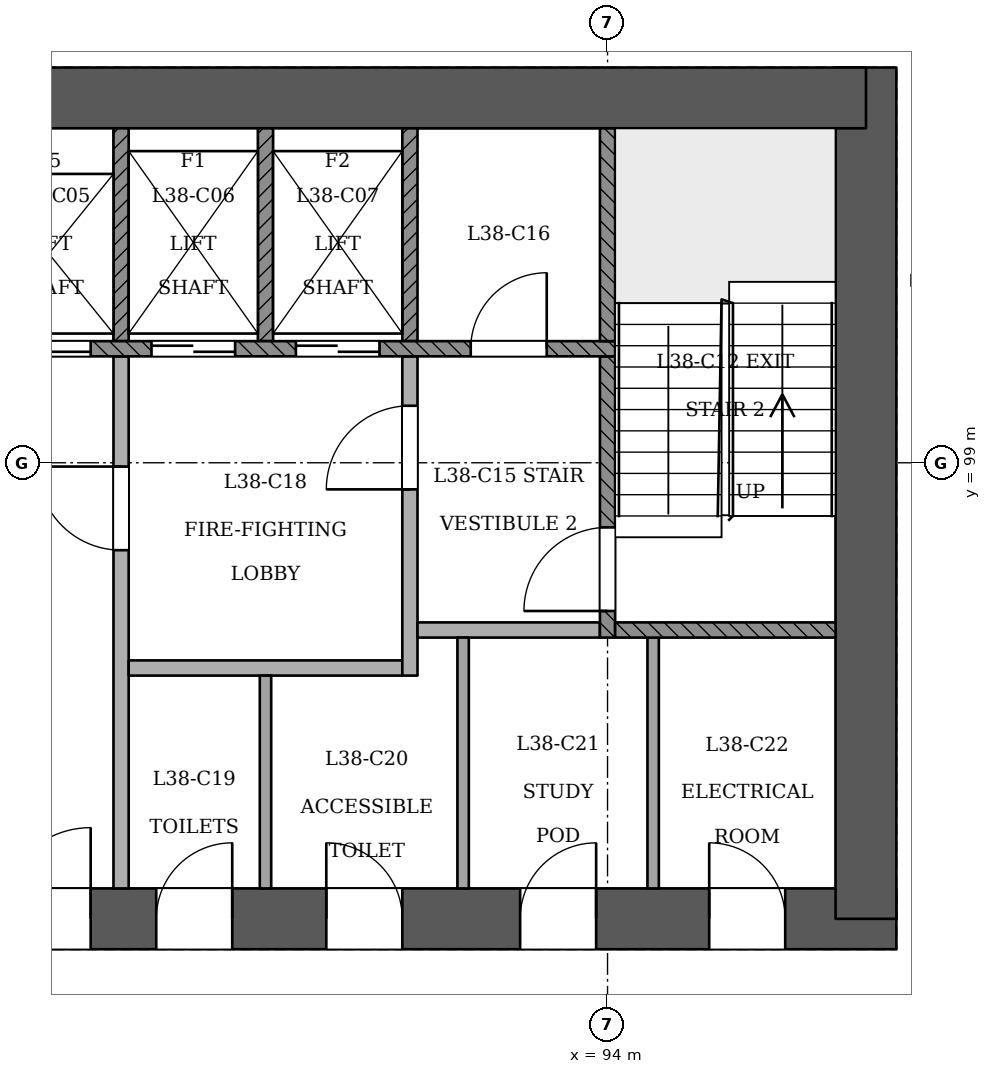
"""IFC4 building model, lengths in metres.
Left out: names, types, materials, properties, quantities, classifications, styles, units other than length and angle.
Written with IfcOpenShell. Run it as: python <this file> out.ifc"""

import sys

from ifc_helpers import new_model, si_unit, direction, frame, frame_2d, origin, place, context, subcontext, project, spatial, rectangle, extrude, element, fill, save


model = new_model("IFC4")
c1 = context("Model", 3, precision=1e-05, world=origin(), true_north=direction((0.0, 1.0)))
c2 = subcontext(c1, "Body", "Model", "MODEL_VIEW")
j1 = project(units=[si_unit("LENGTHUNIT", "METRE"), si_unit("PLANEANGLEUNIT", "RADIAN")], contexts=[c1])
p1 = place(None, origin())
s1 = spatial("IfcSite", under=j1, at=p1, CompositionType="ELEMENT")
p2 = place(p1, origin())
s2 = spatial("IfcBuilding", under=s1, at=p2, CompositionType="ELEMENT")
p3 = place(p2, frame((0.0, 0.0, 149.4)))
s3 = spatial("IfcBuildingStorey", under=s2, at=p3, CompositionType="ELEMENT", Elevation=149.4)
p4 = place(p3, frame((72.6, 93.0, 0.0), z_axis=(0.0, 0.0, 1.0), x_axis=(1.0, 0.0, 0.0)))
e1 = element("IfcWall", 1, at=p4, inside=s3, PredefinedType="SHEAR", context=c2, shape_type="SweptSolid", body=[
    extrude(rectangle(XDim=25.2, YDim=0.8, at=frame_2d((12.6, 0.0))), origin(), (0.0, 0.0, 1.0), 3.6),
])
p5 = place(p4, frame((1.2, 0.0, 0.0)))
e2 = element("IfcOpeningElement", 2, at=p5, cuts=e1, PredefinedType="OPENING", context=c2, shape_type="SweptSolid", body=[
    extrude(rectangle(XDim=1.2, YDim=2.1, at=frame_2d((0.6, 1.05))), frame((0.0, 0.411, 0.0), z_axis=(0.0, -1.0, 0.0), x_axis=(1.0, 0.0, 0.0)), (0.0, 0.0, 1.0), 0.821),
])
p6 = place(p4, frame((3.4, 0.0, 0.0)))
e3 = element("IfcOpeningElement", 3, at=p6, cuts=e1, PredefinedType="OPENING", context=c2, shape_type="SweptSolid", body=[
    extrude(rectangle(XDim=1.2, YDim=2.1, at=frame_2d((0.6, 1.05))), frame((0.0, 0.411, 0.0), z_axis=(0.0, -1.0, 0.0), x_axis=(1.0, 0.0, 0.0)), (0.0, 0.0, 1.0), 0.821),
])
p7 = place(p4, frame((13.4, 0.0, 0.0)))
e4 = element("IfcOpeningElement", 4, at=p7, cuts=e1, PredefinedType="OPENING", context=c2, shape_type="SweptSolid", body=[
    extrude(rectangle(XDim=1.2, YDim=2.1, at=frame_2d((0.6, 1.05))), frame((0.0, 0.411, 0.0), z_axis=(0.0, -1.0, 0.0), x_axis=(1.0, 0.0, 0.0)), (0.0, 0.0, 1.0), 0.821),
])
p8 = place(p4, frame((15.462, 0.0, 0.0)))
e5 = element("IfcOpeningElement", 5, at=p8, cuts=e1, PredefinedType="OPENING", context=c2, shape_type="SweptSolid", body=[
    extrude(rectangle(XDim=1.0, YDim=2.1, at=frame_2d((0.5, 1.05))), frame((0.0, 0.411, 0.0), z_axis=(0.0, -1.0, 0.0), x_axis=(1.0, 0.0, 0.0)), (0.0, 0.0, 1.0), 0.821),
])
p9 = place(p4, frame((17.7, 0.0, 0.0)))
e6 = element("IfcOpeningElement", 6, at=p9, cuts=e1, PredefinedType="OPENING", context=c2, shape_type="SweptSolid", body=[
    extrude(rectangle(XDim=1.0, YDim=2.1, at=frame_2d((0.5, 1.05))), frame((0.0, 0.411, 0.0), z_axis=(0.0, -1.0, 0.0), x_axis=(1.0, 0.0, 0.0)), (0.0, 0.0, 1.0), 0.821),
])
p10 = place(p4, frame((20.25, 0.0, 0.0)))
e7 = element("IfcOpeningElement", 7, at=p10, cuts=e1, PredefinedType="OPENING", context=c2, shape_type="SweptSolid", body=[
    extrude(rectangle(XDim=1.0, YDim=2.1, at=frame_2d((0.5, 1.05))), frame((0.0, 0.411, 0.0), z_axis=(0.0, -1.0, 0.0), x_axis=(1.0, 0.0, 0.0)), (0.0, 0.0, 1.0), 0.821),
])
p11 = place(p4, frame((22.738, 0.0, 0.0)))
e8 = element("IfcOpeningElement", 8, at=p11, cuts=e1, PredefinedType="OPENING", context=c2, shape_type="SweptSolid", body=[
    extrude(rectangle(XDim=1.0, YDim=2.1, at=frame_2d((0.5, 1.05))), frame((0.0, 0.411, 0.0), z_axis=(0.0, -1.0, 0.0), x_axis=(1.0, 0.0, 0.0)), (0.0, 0.0, 1.0), 0.821),
])
p12 = place(p3, frame((97.4, 93.0, 0.0), z_axis=(0.0, 0.0, 1.0), x_axis=(0.0, 1.0, 0.0)))
e9 = element("IfcWall", 9, at=p12, inside=s3, PredefinedType="SHEAR", context=c2, shape_type="SweptSolid", body=[
    extrude(rectangle(XDim=11.2, YDim=0.8, at=frame_2d((5.6, 0.0))), origin(), (0.0, 0.0, 1.0), 3.6),
])
p13 = place(p3, frame((97.4, 103.8, 0.0), z_axis=(0.0, 0.0, 1.0), x_axis=(-1.0, 0.0, 0.0)))
e10 = element("IfcWall", 10, at=p13, inside=s3, PredefinedType="SHEAR", context=c2, shape_type="SweptSolid", body=[
    extrude(rectangle(XDim=25.2, YDim=0.8, at=frame_2d((12.6, 0.0))), origin(), (0.0, 0.0, 1.0), 3.6),
])
p14 = place(p3, frame((85.065, 64.534, 0.0), z_axis=(0.0, 0.0, 1.0), x_axis=(0.500002644497, 0.866023876978, 0.0)))
e11 = element("IfcWall", 11, at=p14, inside=s3, PredefinedType="PARTITIONING", context=c2, shape_type="SweptSolid", body=[
    extrude(rectangle(XDim=39.221, YDim=0.15, at=frame_2d((19.61, 0.0))), origin(), (0.0, 0.0, 1.0), 2.75),
])
p15 = place(p14, frame((0.506, 0.0, 0.0)))
e12 = element("IfcOpeningElement", 12, at=p15, cuts=e11, PredefinedType="OPENING", context=c2, shape_type="SweptSolid", body=[
    extrude(rectangle(XDim=1.2, YDim=2.1, at=frame_2d((0.6, 1.05))), frame((0.0, 0.085, 0.0), z_axis=(0.0, -1.0, 0.0), x_axis=(1.0, 0.0, 0.0)), (0.0, 0.0, 1.0), 0.171),
])
p16 = place(p14, frame((8.825, 0.0, 0.0)))
e13 = element("IfcOpeningElement", 13, at=p16, cuts=e11, PredefinedType="OPENING", context=c2, shape_type="SweptSolid", body=[
    extrude(rectangle(XDim=1.0, YDim=2.1, at=frame_2d((0.5, 1.05))), frame((0.0, 0.085, 0.0), z_axis=(0.0, -1.0, 0.0), x_axis=(1.0, 0.0, 0.0)), (0.0, 0.0, 1.0), 0.171),
])
p17 = place(p14, frame((11.266, 0.0, 0.0)))
e14 = element("IfcOpeningElement", 14, at=p17, cuts=e11, PredefinedType="OPENING", context=c2, shape_type="SweptSolid", body=[
    extrude(rectangle(XDim=1.0, YDim=2.1, at=frame_2d((0.5, 1.05))), frame((0.0, 0.085, 0.0), z_axis=(0.0, -1.0, 0.0), x_axis=(1.0, 0.0, 0.0)), (0.0, 0.0, 1.0), 0.171),
])
p18 = place(p14, frame((17.825, 0.0, 0.0)))
e15 = element("IfcOpeningElement", 15, at=p18, cuts=e11, PredefinedType="OPENING", context=c2, shape_type="SweptSolid", body=[
    extrude(rectangle(XDim=1.0, YDim=2.1, at=frame_2d((0.5, 1.05))), frame((0.0, 0.085, 0.0), z_axis=(0.0, -1.0, 0.0), x_axis=(1.0, 0.0, 0.0)), (0.0, 0.0, 1.0), 0.171),
])
p19 = place(p14, frame((20.266, 0.0, 0.0)))
e16 = element("IfcOpeningElement", 16, at=p19, cuts=e11, PredefinedType="OPENING", context=c2, shape_type="SweptSolid", body=[
    extrude(rectangle(XDim=1.0, YDim=2.1, at=frame_2d((0.5, 1.05))), frame((0.0, 0.085, 0.0), z_axis=(0.0, -1.0, 0.0), x_axis=(1.0, 0.0, 0.0)), (0.0, 0.0, 1.0), 0.171),
])
p20 = place(p14, frame((26.825, 0.0, 0.0)))
e17 = element("IfcOpeningElement", 17, at=p20, cuts=e11, PredefinedType="OPENING", context=c2, shape_type="SweptSolid", body=[
    extrude(rectangle(XDim=1.0, YDim=2.1, at=frame_2d((0.5, 1.05))), frame((0.0, 0.085, 0.0), z_axis=(0.0, -1.0, 0.0), x_axis=(1.0, 0.0, 0.0)), (0.0, 0.0, 1.0), 0.171),
])
p21 = place(p14, frame((30.296, 0.0, 0.0)))
e18 = element("IfcOpeningElement", 18, at=p21, cuts=e11, PredefinedType="OPENING", context=c2, shape_type="SweptSolid", body=[
    extrude(rectangle(XDim=1.0, YDim=2.1, at=frame_2d((0.5, 1.05))), frame((0.0, 0.085, 0.0), z_axis=(0.0, -1.0, 0.0), x_axis=(1.0, 0.0, 0.0)), (0.0, 0.0, 1.0), 0.171),
])
p22 = place(p14, frame((35.875, 0.0, 0.0)))
e19 = element("IfcOpeningElement", 19, at=p22, cuts=e11, PredefinedType="OPENING", context=c2, shape_type="SweptSolid", body=[
    extrude(rectangle(XDim=1.1, YDim=2.1, at=frame_2d((0.55, 1.05))), frame((0.0, 0.085, 0.0), z_axis=(0.0, -1.0, 0.0), x_axis=(1.0, 0.0, 0.0)), (0.0, 0.0, 1.0), 0.171),
])
p23 = place(p14, frame((37.821, 0.0, 0.0)))
e20 = element("IfcOpeningElement", 20, at=p23, cuts=e11, PredefinedType="OPENING", context=c2, shape_type="SweptSolid", body=[
    extrude(rectangle(XDim=1.2, YDim=2.1, at=frame_2d((0.6, 1.05))), frame((0.0, 0.085, 0.0), z_axis=(0.0, -1.0, 0.0), x_axis=(1.0, 0.0, 0.0)), (0.0, 0.0, 1.0), 0.171),
])
p24 = place(p3, frame((87.6, 93.4, 0.0), z_axis=(0.0, 0.0, 1.0), x_axis=(0.0, 1.0, 0.0)))
e21 = element("IfcWall", 21, at=p24, inside=s3, PredefinedType="PARTITIONING", context=c2, shape_type="SweptSolid", body=[
    extrude(rectangle(XDim=7.0, YDim=0.2, at=frame_2d((3.5, 0.0))), origin(), (0.0, 0.0, 1.0), 3.15),
])
p25 = place(p24, frame((4.45, 0.0, 0.0)))
e22 = element("IfcOpeningElement", 22, at=p25, cuts=e21, PredefinedType="OPENING", context=c2, shape_type="SweptSolid", body=[
    extrude(rectangle(XDim=1.1, YDim=2.1, at=frame_2d((0.55, 1.05))), frame((0.0, 0.11, 0.0), z_axis=(0.0, -1.0, 0.0), x_axis=(1.0, 0.0, 0.0)), (0.0, 0.0, 1.0), 0.221),
])
p26 = place(p3, frame((89.5, 93.4, 0.0), z_axis=(0.0, 0.0, 1.0), x_axis=(0.0, 1.0, 0.0)))
e23 = element("IfcWall", 23, at=p26, inside=s3, PredefinedType="PARTITIONING", context=c2, shape_type="SweptSolid", body=[
    extrude(rectangle(XDim=2.8, YDim=0.15, at=frame_2d((1.4, 0.0))), origin(), (0.0, 0.0, 1.0), 3.15),
])
for number, where, z_axis, x_axis in (
    (24, (92.1, 93.4, 0.0), (0.0, 0.0, 1.0), (0.0, 1.0, 0.0)),
    (25, (94.6, 93.4, 0.0), (0.0, 0.0, 1.0), (0.0, 1.0, 0.0)),
):
    element("IfcWall", number, at=place(p3, frame(where, z_axis=z_axis, x_axis=x_axis)), inside=s3, PredefinedType="PARTITIONING", context=c2, shape_type="SweptSolid", body=[
        extrude(rectangle(XDim=3.3, YDim=0.15, at=frame_2d((1.65, 0.0))), origin(), (0.0, 0.0, 1.0), 3.15),
    ])
p27 = place(p3, frame((87.7, 96.3, 0.0), z_axis=(0.0, 0.0, 1.0), x_axis=(1.0, 0.0, 0.0)))
e26 = element("IfcWall", 26, at=p27, inside=s3, PredefinedType="PARTITIONING", context=c2, shape_type="SweptSolid", body=[
    extrude(rectangle(XDim=3.6, YDim=0.2, at=frame_2d((1.8, 0.0))), origin(), (0.0, 0.0, 1.0), 3.15),
])
p28 = place(p3, frame((91.4, 96.2, 0.0), z_axis=(0.0, 0.0, 1.0), x_axis=(0.0, 1.0, 0.0)))
e27 = element("IfcWall", 27, at=p28, inside=s3, PredefinedType="PARTITIONING", context=c2, shape_type="SweptSolid", body=[
    extrude(rectangle(XDim=4.2, YDim=0.2, at=frame_2d((2.1, 0.0))), origin(), (0.0, 0.0, 1.0), 3.15),
])
p29 = place(p28, frame((2.45, 0.0, 0.0)))
e28 = element("IfcOpeningElement", 28, at=p29, cuts=e27, PredefinedType="OPENING", context=c2, shape_type="SweptSolid", body=[
    extrude(rectangle(XDim=1.1, YDim=2.1, at=frame_2d((0.55, 1.05))), frame((0.0, 0.11, 0.0), z_axis=(0.0, -1.0, 0.0), x_axis=(1.0, 0.0, 0.0)), (0.0, 0.0, 1.0), 0.221),
])
p30 = place(p3, frame((91.5, 96.8, 0.0), z_axis=(0.0, 0.0, 1.0), x_axis=(1.0, 0.0, 0.0)))
e29 = element("IfcWall", 29, at=p30, inside=s3, PredefinedType="PARTITIONING", context=c2, shape_type="SweptSolid", body=[
    extrude(rectangle(XDim=2.4, YDim=0.2, at=frame_2d((1.2, 0.0))), origin(), (0.0, 0.0, 1.0), 3.15),
])
p31 = place(p3, frame((94.0, 96.7, 0.0), z_axis=(0.0, 0.0, 1.0), x_axis=(0.0, 1.0, 0.0)))
e30 = element("IfcWall", 30, at=p31, inside=s3, PredefinedType="SOLIDWALL", context=c2, shape_type="SweptSolid", body=[
    extrude(rectangle(XDim=3.7, YDim=0.2, at=frame_2d((1.85, 0.0))), origin(), (0.0, 0.0, 1.0), 3.15),
])
p32 = place(p31, frame((0.35, 0.0, 0.0)))
e31 = element("IfcOpeningElement", 31, at=p32, cuts=e30, PredefinedType="OPENING", context=c2, shape_type="SweptSolid", body=[
    extrude(rectangle(XDim=1.1, YDim=2.1, at=frame_2d((0.55, 1.05))), frame((0.0, 0.11, 0.0), z_axis=(0.0, -1.0, 0.0), x_axis=(1.0, 0.0, 0.0)), (0.0, 0.0, 1.0), 0.221),
])
p33 = place(p3, frame((94.1, 96.8, 0.0), z_axis=(0.0, 0.0, 1.0), x_axis=(1.0, 0.0, 0.0)))
e32 = element("IfcWall", 32, at=p33, inside=s3, PredefinedType="SOLIDWALL", context=c2, shape_type="SweptSolid", body=[
    extrude(rectangle(XDim=2.9, YDim=0.2, at=frame_2d((1.45, 0.0))), origin(), (0.0, 0.0, 1.0), 3.15),
])
p34 = place(p3, frame((75.9, 100.5, 0.0), z_axis=(0.0, 0.0, 1.0), x_axis=(1.0, 0.0, 0.0)))
e33 = element("IfcWall", 33, at=p34, inside=s3, PredefinedType="SOLIDWALL", context=c2, shape_type="SweptSolid", body=[
    extrude(rectangle(XDim=18.2, YDim=0.2, at=frame_2d((9.1, 0.0))), origin(), (0.0, 0.0, 1.0), 3.15),
])
p35 = place(p34, frame((2.6, 0.0, 0.0)))
e34 = element("IfcOpeningElement", 34, at=p35, cuts=e33, PredefinedType="OPENING", context=c2, shape_type="SweptSolid", body=[
    extrude(rectangle(XDim=1.1, YDim=2.1, at=frame_2d((0.55, 1.05))), frame((0.0, 0.11, 0.0), z_axis=(0.0, -1.0, 0.0), x_axis=(1.0, 0.0, 0.0)), (0.0, 0.0, 1.0), 0.221),
])
p36 = place(p34, frame((4.5, 0.0, 0.0)))
e35 = element("IfcOpeningElement", 35, at=p36, cuts=e33, PredefinedType="OPENING", context=c2, shape_type="SweptSolid", body=[
    extrude(rectangle(XDim=1.1, YDim=2.1, at=frame_2d((0.55, 1.05))), frame((0.0, 0.11, 0.0), z_axis=(0.0, -1.0, 0.0), x_axis=(1.0, 0.0, 0.0)), (0.0, 0.0, 1.0), 0.221),
])
p37 = place(p34, frame((6.4, 0.0, 0.0)))
e36 = element("IfcOpeningElement", 36, at=p37, cuts=e33, PredefinedType="OPENING", context=c2, shape_type="SweptSolid", body=[
    extrude(rectangle(XDim=1.1, YDim=2.1, at=frame_2d((0.55, 1.05))), frame((0.0, 0.11, 0.0), z_axis=(0.0, -1.0, 0.0), x_axis=(1.0, 0.0, 0.0)), (0.0, 0.0, 1.0), 0.221),
])
p38 = place(p34, frame((8.3, 0.0, 0.0)))
e37 = element("IfcOpeningElement", 37, at=p38, cuts=e33, PredefinedType="OPENING", context=c2, shape_type="SweptSolid", body=[
    extrude(rectangle(XDim=1.1, YDim=2.1, at=frame_2d((0.55, 1.05))), frame((0.0, 0.11, 0.0), z_axis=(0.0, -1.0, 0.0), x_axis=(1.0, 0.0, 0.0)), (0.0, 0.0, 1.0), 0.221),
])
p39 = place(p34, frame((10.2, 0.0, 0.0)))
e38 = element("IfcOpeningElement", 38, at=p39, cuts=e33, PredefinedType="OPENING", context=c2, shape_type="SweptSolid", body=[
    extrude(rectangle(XDim=1.1, YDim=2.1, at=frame_2d((0.55, 1.05))), frame((0.0, 0.11, 0.0), z_axis=(0.0, -1.0, 0.0), x_axis=(1.0, 0.0, 0.0)), (0.0, 0.0, 1.0), 0.221),
])
p40 = place(p34, frame((12.1, 0.0, 0.0)))
e39 = element("IfcOpeningElement", 39, at=p40, cuts=e33, PredefinedType="OPENING", context=c2, shape_type="SweptSolid", body=[
    extrude(rectangle(XDim=1.1, YDim=2.1, at=frame_2d((0.55, 1.05))), frame((0.0, 0.11, 0.0), z_axis=(0.0, -1.0, 0.0), x_axis=(1.0, 0.0, 0.0)), (0.0, 0.0, 1.0), 0.221),
])
p41 = place(p34, frame((14.0, 0.0, 0.0)))
e40 = element("IfcOpeningElement", 40, at=p41, cuts=e33, PredefinedType="OPENING", context=c2, shape_type="SweptSolid", body=[
    extrude(rectangle(XDim=1.1, YDim=2.1, at=frame_2d((0.55, 1.05))), frame((0.0, 0.11, 0.0), z_axis=(0.0, -1.0, 0.0), x_axis=(1.0, 0.0, 0.0)), (0.0, 0.0, 1.0), 0.221),
])
p42 = place(p34, frame((0.65, 0.0, 0.0)))
e41 = element("IfcOpeningElement", 41, at=p42, cuts=e33, PredefinedType="OPENING", context=c2, shape_type="SweptSolid", body=[
    extrude(rectangle(XDim=1.0, YDim=2.1, at=frame_2d((0.5, 1.05))), frame((0.0, 0.11, 0.0), z_axis=(0.0, -1.0, 0.0), x_axis=(1.0, 0.0, 0.0)), (0.0, 0.0, 1.0), 0.221),
])
p43 = place(p34, frame((16.3, 0.0, 0.0)))
e42 = element("IfcOpeningElement", 42, at=p43, cuts=e33, PredefinedType="OPENING", context=c2, shape_type="SweptSolid", body=[
    extrude(rectangle(XDim=1.0, YDim=2.1, at=frame_2d((0.5, 1.05))), frame((0.0, 0.11, 0.0), z_axis=(0.0, -1.0, 0.0), x_axis=(1.0, 0.0, 0.0)), (0.0, 0.0, 1.0), 0.221),
])
for number, where, z_axis, x_axis in (
    (43, (87.6, 100.6, 0.0), (0.0, 0.0, 1.0), (0.0, 1.0, 0.0)),
    (44, (89.5, 100.6, 0.0), (0.0, 0.0, 1.0), (0.0, 1.0, 0.0)),
    (45, (91.4, 100.6, 0.0), (0.0, 0.0, 1.0), (0.0, 1.0, 0.0)),
    (46, (94.0, 100.6, 0.0), (0.0, 0.0, 1.0), (0.0, 1.0, 0.0)),
):
    element("IfcWall", number, at=place(p3, frame(where, z_axis=z_axis, x_axis=x_axis)), inside=s3, PredefinedType="SOLIDWALL", context=c2, shape_type="SweptSolid", body=[
        extrude(rectangle(XDim=2.8, YDim=0.2, at=frame_2d((1.4, 0.0))), origin(), (0.0, 0.0, 1.0), 3.15),
    ])
p44 = place(p39, origin())
e47 = element("IfcDoor", 47, at=p44, inside=s3, OperationType="SLIDING_TO_RIGHT", PredefinedType="NOTDEFINED", context=c2, shape_type="SweptSolid", body=[
    extrude(rectangle(XDim=1.1, YDim=2.1, at=frame_2d((0.55, 1.05))), frame((0.0, 0.025, 0.0), z_axis=(0.0, -1.0, 0.0), x_axis=(1.0, 0.0, 0.0)), (0.0, 0.0, 1.0), 0.05),
])
fill(e38, e47)
p45 = place(p40, origin())
e48 = element("IfcDoor", 48, at=p45, inside=s3, OperationType="SLIDING_TO_RIGHT", PredefinedType="NOTDEFINED", context=c2, shape_type="SweptSolid", body=[
    extrude(rectangle(XDim=1.1, YDim=2.1, at=frame_2d((0.55, 1.05))), frame((0.0, 0.025, 0.0), z_axis=(0.0, -1.0, 0.0), x_axis=(1.0, 0.0, 0.0)), (0.0, 0.0, 1.0), 0.05),
])
fill(e39, e48)
p46 = place(p41, origin())
e49 = element("IfcDoor", 49, at=p46, inside=s3, OperationType="SLIDING_TO_LEFT", PredefinedType="NOTDEFINED", context=c2, shape_type="SweptSolid", body=[
    extrude(rectangle(XDim=1.1, YDim=2.1, at=frame_2d((0.55, 1.05))), frame((0.0, 0.025, 0.0), z_axis=(0.0, -1.0, 0.0), x_axis=(1.0, 0.0, 0.0)), (0.0, 0.0, 1.0), 0.05),
])
fill(e40, e49)
p47 = place(p32, origin())
e50 = element("IfcDoor", 50, at=p47, inside=s3, OperationType="SINGLE_SWING_LEFT", PredefinedType="NOTDEFINED", context=c2, shape_type="SweptSolid", body=[
    extrude(rectangle(XDim=1.1, YDim=2.1, at=frame_2d((0.55, 1.05))), frame((0.0, 0.025, 0.0), z_axis=(0.0, -1.0, 0.0), x_axis=(1.0, 0.0, 0.0)), (0.0, 0.0, 1.0), 0.05),
])
fill(e31, e50)
p48 = place(p25, origin())
e51 = element("IfcDoor", 51, at=p48, inside=s3, OperationType="SINGLE_SWING_RIGHT", PredefinedType="NOTDEFINED", context=c2, shape_type="SweptSolid", body=[
    extrude(rectangle(XDim=1.1, YDim=2.1, at=frame_2d((0.55, 1.05))), frame((0.0, 0.025, 0.0), z_axis=(0.0, -1.0, 0.0), x_axis=(1.0, 0.0, 0.0)), (0.0, 0.0, 1.0), 0.05),
])
fill(e22, e51)
p49 = place(p29, origin())
e52 = element("IfcDoor", 52, at=p49, inside=s3, OperationType="SINGLE_SWING_LEFT", PredefinedType="NOTDEFINED", context=c2, shape_type="SweptSolid", body=[
    extrude(rectangle(XDim=1.1, YDim=2.1, at=frame_2d((0.55, 1.05))), frame((0.0, 0.025, 0.0), z_axis=(0.0, -1.0, 0.0), x_axis=(1.0, 0.0, 0.0)), (0.0, 0.0, 1.0), 0.05),
])
fill(e28, e52)
p50 = place(p7, origin())
e53 = element("IfcDoor", 53, at=p50, inside=s3, OperationType="SINGLE_SWING_RIGHT", PredefinedType="NOTDEFINED", context=c2, shape_type="SweptSolid", body=[
    extrude(rectangle(XDim=1.2, YDim=2.1, at=frame_2d((0.6, 1.05))), frame((0.0, 0.025, 0.0), z_axis=(0.0, -1.0, 0.0), x_axis=(1.0, 0.0, 0.0)), (0.0, 0.0, 1.0), 0.05),
])
fill(e4, e53)
p51 = place(p43, origin())
e54 = element("IfcDoor", 54, at=p51, inside=s3, OperationType="SINGLE_SWING_RIGHT", PredefinedType="NOTDEFINED", context=c2, shape_type="SweptSolid", body=[
    extrude(rectangle(XDim=1.0, YDim=2.1, at=frame_2d((0.5, 1.05))), frame((0.0, 0.025, 0.0), z_axis=(0.0, -1.0, 0.0), x_axis=(1.0, 0.0, 0.0)), (0.0, 0.0, 1.0), 0.05),
])
fill(e42, e54)
p52 = place(p8, origin())
e55 = element("IfcDoor", 55, at=p52, inside=s3, OperationType="SINGLE_SWING_RIGHT", PredefinedType="NOTDEFINED", context=c2, shape_type="SweptSolid", body=[
    extrude(rectangle(XDim=1.0, YDim=2.1, at=frame_2d((0.5, 1.05))), frame((0.0, 0.025, 0.0), z_axis=(0.0, -1.0, 0.0), x_axis=(1.0, 0.0, 0.0)), (0.0, 0.0, 1.0), 0.05),
])
fill(e5, e55)
p53 = place(p9, origin())
e56 = element("IfcDoor", 56, at=p53, inside=s3, OperationType="SINGLE_SWING_LEFT", PredefinedType="NOTDEFINED", context=c2, shape_type="SweptSolid", body=[
    extrude(rectangle(XDim=1.0, YDim=2.1, at=frame_2d((0.5, 1.05))), frame((0.0, 0.025, 0.0), z_axis=(0.0, -1.0, 0.0), x_axis=(1.0, 0.0, 0.0)), (0.0, 0.0, 1.0), 0.05),
])
fill(e6, e56)
p54 = place(p10, origin())
e57 = element("IfcDoor", 57, at=p54, inside=s3, OperationType="SINGLE_SWING_RIGHT", PredefinedType="NOTDEFINED", context=c2, shape_type="SweptSolid", body=[
    extrude(rectangle(XDim=1.0, YDim=2.1, at=frame_2d((0.5, 1.05))), frame((0.0, 0.025, 0.0), z_axis=(0.0, -1.0, 0.0), x_axis=(1.0, 0.0, 0.0)), (0.0, 0.0, 1.0), 0.05),
])
fill(e7, e57)
p55 = place(p11, origin())
e58 = element("IfcDoor", 58, at=p55, inside=s3, OperationType="SINGLE_SWING_LEFT", PredefinedType="NOTDEFINED", context=c2, shape_type="SweptSolid", body=[
    extrude(rectangle(XDim=1.0, YDim=2.1, at=frame_2d((0.5, 1.05))), frame((0.0, 0.025, 0.0), z_axis=(0.0, -1.0, 0.0), x_axis=(1.0, 0.0, 0.0)), (0.0, 0.0, 1.0), 0.05),
])
fill(e8, e58)
save(model, sys.argv[1])
